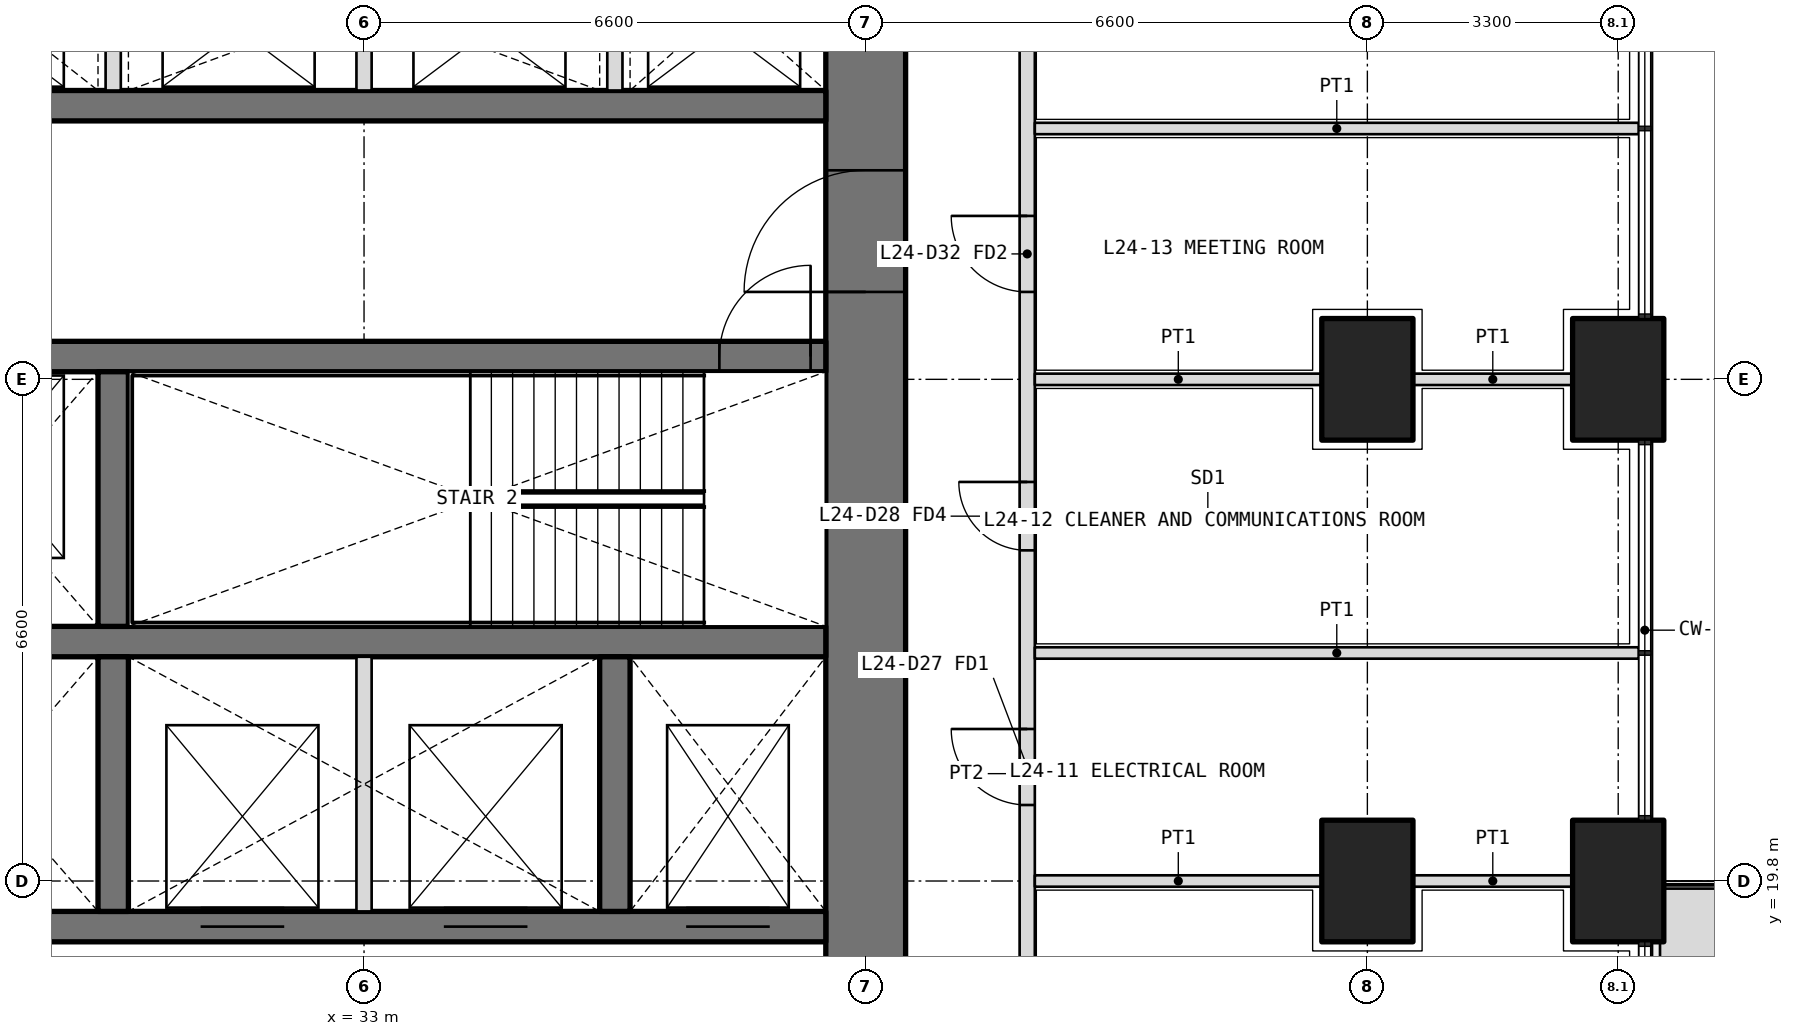
"""IFC4 building model, lengths in metres.
Left out: names, types, materials, properties, quantities, classifications, styles, units other than length and angle.
Written with IfcOpenShell. Run it as: python <this file> out.ifc"""

import sys

from ifc_helpers import new_model, si_unit, direction, frame, frame_2d, origin, origin_2d, place, context, subcontext, project, spatial, polyline, rectangle, outline, extrude, element, fill, save


model = new_model("IFC4")
c1 = context("Model", 3, precision=1e-05, world=origin(), true_north=direction((0.0, 1.0)))
c2 = subcontext(c1, "Body", "Model", "MODEL_VIEW")
j1 = project(units=[si_unit("LENGTHUNIT", "METRE"), si_unit("PLANEANGLEUNIT", "RADIAN")], contexts=[c1])
p1 = place(None, origin())
s1 = spatial("IfcSite", under=j1, at=p1, CompositionType="ELEMENT")
p2 = place(p1, origin())
s2 = spatial("IfcBuilding", under=s1, at=p2, CompositionType="ELEMENT")
p3 = place(p2, frame((0.0, 0.0, 107.4)))
s3 = spatial("IfcBuildingStorey", under=s2, at=p3, CompositionType="ELEMENT", Elevation=107.4)
for number, where, z_axis, x_axis in (
    (1, (49.5, 19.8, 0.0), (0.0, 0.0, 1.0), (0.0, 1.0, 0.0)),
    (2, (49.5, 26.4, 0.0), (0.0, 0.0, 1.0), (0.0, 1.0, 0.0)),
    (3, (46.2, 19.8, 0.0), (0.0, 0.0, 1.0), (0.0, 1.0, 0.0)),
    (4, (46.2, 26.4, 0.0), (0.0, 0.0, 1.0), (0.0, 1.0, 0.0)),
):
    element("IfcColumn", number, at=place(p3, frame(where, z_axis=z_axis, x_axis=x_axis)), inside=s3, PredefinedType="COLUMN", context=c2, shape_type="SweptSolid", body=[
        extrude(rectangle(XDim=1.6, YDim=1.2, at=origin_2d()), origin(), (0.0, 0.0, 1.0), 4.2),
    ])
p4 = place(p3, origin())
e5 = element("IfcWall", 5, at=p4, inside=s3, PredefinedType="USERDEFINED", context=c2, shape_type="SweptSolid", body=[
    extrude(outline(polyline([(50.05, 10.65), (51.05, 10.65), (51.05, 19.7), (50.05, 19.7), (50.05, 10.65)]), holes=[polyline([(50.2, 10.8), (50.9, 10.8), (50.9, 19.55), (50.2, 19.55), (50.2, 10.8)])]), origin(), (0.0, 0.0, 1.0), 1.05),
])
p5 = place(p3, frame((39.6, 13.725, 0.0), z_axis=(0.0, 0.0, 1.0), x_axis=(0.0, 1.0, 0.0)))
e6 = element("IfcWall", 6, at=p5, inside=s3, PredefinedType="SHEAR", context=c2, shape_type="SweptSolid", body=[
    extrude(rectangle(XDim=18.75, YDim=1.05, at=frame_2d((9.375, 0.0))), origin(), (0.0, 0.0, 1.0), 4.2),
])
p6 = place(p5, frame((3.025, 0.0, 0.0)))
e7 = element("IfcOpeningElement", 7, at=p6, cuts=e6, PredefinedType="OPENING", context=c2, shape_type="SweptSolid", body=[
    extrude(rectangle(XDim=1.6, YDim=2.1, at=frame_2d((0.8, 1.05))), frame((0.0, 0.535, 0.0), z_axis=(0.0, -1.0, 0.0), x_axis=(1.0, 0.0, 0.0)), (0.0, 0.0, 1.0), 1.07),
])
p7 = place(p5, frame((13.825, 0.0, 0.0)))
e8 = element("IfcOpeningElement", 8, at=p7, cuts=e6, PredefinedType="OPENING", context=c2, shape_type="SweptSolid", body=[
    extrude(rectangle(XDim=1.6, YDim=2.1, at=frame_2d((0.8, 1.05))), frame((0.0, 0.535, 0.0), z_axis=(0.0, -1.0, 0.0), x_axis=(1.0, 0.0, 0.0)), (0.0, 0.0, 1.0), 1.07),
])
p8 = place(p3, frame((13.725, 19.2, 0.0), z_axis=(0.0, 0.0, 1.0), x_axis=(1.0, 0.0, 0.0)))
e9 = element("IfcWall", 9, at=p8, inside=s3, PredefinedType="SHEAR", context=c2, shape_type="SweptSolid", body=[
    extrude(rectangle(XDim=25.35, YDim=0.4, at=frame_2d((12.675, 0.0))), origin(), (0.0, 0.0, 1.0), 4.2),
])
p9 = place(p8, frame((10.575, 0.0, 0.0)))
e10 = element("IfcOpeningElement", 10, at=p9, cuts=e9, PredefinedType="OPENING", context=c2, shape_type="SweptSolid", body=[
    extrude(rectangle(XDim=0.9, YDim=2.1, at=frame_2d((0.45, 1.05))), frame((0.0, 0.21, 0.0), z_axis=(0.0, -1.0, 0.0), x_axis=(1.0, 0.0, 0.0)), (0.0, 0.0, 1.0), 0.42),
])
p10 = place(p8, frame((13.875, 0.0, 0.0)))
e11 = element("IfcOpeningElement", 11, at=p10, cuts=e9, PredefinedType="OPENING", context=c2, shape_type="SweptSolid", body=[
    extrude(rectangle(XDim=0.9, YDim=2.1, at=frame_2d((0.45, 1.05))), frame((0.0, 0.21, 0.0), z_axis=(0.0, -1.0, 0.0), x_axis=(1.0, 0.0, 0.0)), (0.0, 0.0, 1.0), 0.42),
])
p11 = place(p8, frame((0.2, 0.0, 0.0)))
e12 = element("IfcOpeningElement", 12, at=p11, cuts=e9, PredefinedType="OPENING", context=c2, shape_type="SweptSolid", body=[
    extrude(rectangle(XDim=1.2, YDim=2.1, at=frame_2d((0.6, 1.05))), frame((0.0, 0.21, 0.0), z_axis=(0.0, -1.0, 0.0), x_axis=(1.0, 0.0, 0.0)), (0.0, 0.0, 1.0), 0.42),
])
p12 = place(p8, frame((23.512, 0.0, 0.0)))
e13 = element("IfcOpeningElement", 13, at=p12, cuts=e9, PredefinedType="OPENING", context=c2, shape_type="SweptSolid", body=[
    extrude(rectangle(XDim=1.1, YDim=2.1, at=frame_2d((0.55, 1.05))), frame((0.0, 0.21, 0.0), z_axis=(0.0, -1.0, 0.0), x_axis=(1.0, 0.0, 0.0)), (0.0, 0.0, 1.0), 0.42),
])
p13 = place(p8, frame((17.125, 0.0, 0.0)))
e14 = element("IfcOpeningElement", 14, at=p13, cuts=e9, PredefinedType="OPENING", context=c2, shape_type="SweptSolid", body=[
    extrude(rectangle(XDim=1.1, YDim=2.1, at=frame_2d((0.55, 1.05))), frame((0.0, 0.21, 0.0), z_axis=(0.0, -1.0, 0.0), x_axis=(1.0, 0.0, 0.0)), (0.0, 0.0, 1.0), 0.42),
])
p14 = place(p8, frame((20.325, 0.0, 0.0)))
e15 = element("IfcOpeningElement", 15, at=p14, cuts=e9, PredefinedType="OPENING", context=c2, shape_type="SweptSolid", body=[
    extrude(rectangle(XDim=1.1, YDim=2.1, at=frame_2d((0.55, 1.05))), frame((0.0, 0.21, 0.0), z_axis=(0.0, -1.0, 0.0), x_axis=(1.0, 0.0, 0.0)), (0.0, 0.0, 1.0), 0.42),
])
p15 = place(p3, frame((13.725, 22.95, 0.0), z_axis=(0.0, 0.0, 1.0), x_axis=(1.0, 0.0, 0.0)))
e16 = element("IfcWall", 16, at=p15, inside=s3, PredefinedType="SHEAR", context=c2, shape_type="SweptSolid", body=[
    extrude(rectangle(XDim=25.35, YDim=0.4, at=frame_2d((12.675, 0.0))), origin(), (0.0, 0.0, 1.0), 4.2),
])
p16 = place(p3, frame((13.725, 26.7, 0.0), z_axis=(0.0, 0.0, 1.0), x_axis=(1.0, 0.0, 0.0)))
e17 = element("IfcWall", 17, at=p16, inside=s3, PredefinedType="SHEAR", context=c2, shape_type="SweptSolid", body=[
    extrude(rectangle(XDim=25.35, YDim=0.4, at=frame_2d((12.675, 0.0))), origin(), (0.0, 0.0, 1.0), 4.2),
])
p17 = place(p16, frame((23.95, 0.0, 0.0)))
e18 = element("IfcOpeningElement", 18, at=p17, cuts=e17, PredefinedType="OPENING", context=c2, shape_type="SweptSolid", body=[
    extrude(rectangle(XDim=1.2, YDim=2.1, at=frame_2d((0.6, 1.05))), frame((0.0, 0.21, 0.0), z_axis=(0.0, -1.0, 0.0), x_axis=(1.0, 0.0, 0.0)), (0.0, 0.0, 1.0), 0.42),
])
p18 = place(p16, frame((0.738, 0.0, 0.0)))
e19 = element("IfcOpeningElement", 19, at=p18, cuts=e17, PredefinedType="OPENING", context=c2, shape_type="SweptSolid", body=[
    extrude(rectangle(XDim=1.1, YDim=2.1, at=frame_2d((0.55, 1.05))), frame((0.0, 0.21, 0.0), z_axis=(0.0, -1.0, 0.0), x_axis=(1.0, 0.0, 0.0)), (0.0, 0.0, 1.0), 0.42),
])
p19 = place(p16, frame((3.925, 0.0, 0.0)))
e20 = element("IfcOpeningElement", 20, at=p19, cuts=e17, PredefinedType="OPENING", context=c2, shape_type="SweptSolid", body=[
    extrude(rectangle(XDim=1.1, YDim=2.1, at=frame_2d((0.55, 1.05))), frame((0.0, 0.21, 0.0), z_axis=(0.0, -1.0, 0.0), x_axis=(1.0, 0.0, 0.0)), (0.0, 0.0, 1.0), 0.42),
])
p20 = place(p16, frame((7.175, 0.0, 0.0)))
e21 = element("IfcOpeningElement", 21, at=p20, cuts=e17, PredefinedType="OPENING", context=c2, shape_type="SweptSolid", body=[
    extrude(rectangle(XDim=1.1, YDim=2.1, at=frame_2d((0.55, 1.05))), frame((0.0, 0.21, 0.0), z_axis=(0.0, -1.0, 0.0), x_axis=(1.0, 0.0, 0.0)), (0.0, 0.0, 1.0), 0.42),
])
p21 = place(p16, frame((10.425, 0.0, 0.0)))
e22 = element("IfcOpeningElement", 22, at=p21, cuts=e17, PredefinedType="OPENING", context=c2, shape_type="SweptSolid", body=[
    extrude(rectangle(XDim=1.1, YDim=2.1, at=frame_2d((0.55, 1.05))), frame((0.0, 0.21, 0.0), z_axis=(0.0, -1.0, 0.0), x_axis=(1.0, 0.0, 0.0)), (0.0, 0.0, 1.0), 0.42),
])
p22 = place(p16, frame((13.775, 0.0, 0.0)))
e23 = element("IfcOpeningElement", 23, at=p22, cuts=e17, PredefinedType="OPENING", context=c2, shape_type="SweptSolid", body=[
    extrude(rectangle(XDim=1.1, YDim=2.1, at=frame_2d((0.55, 1.05))), frame((0.0, 0.21, 0.0), z_axis=(0.0, -1.0, 0.0), x_axis=(1.0, 0.0, 0.0)), (0.0, 0.0, 1.0), 0.42),
])
p23 = place(p3, frame((13.725, 30.0, 0.0), z_axis=(0.0, 0.0, 1.0), x_axis=(1.0, 0.0, 0.0)))
e24 = element("IfcWall", 24, at=p23, inside=s3, PredefinedType="SHEAR", context=c2, shape_type="SweptSolid", body=[
    extrude(rectangle(XDim=25.35, YDim=0.4, at=frame_2d((12.675, 0.0))), origin(), (0.0, 0.0, 1.0), 4.2),
])
for number, where, z_axis, x_axis in (
    (25, (29.7, 19.4, 0.0), (0.0, 0.0, 1.0), (0.0, 1.0, 0.0)),
    (26, (36.3, 19.4, 0.0), (0.0, 0.0, 1.0), (0.0, 1.0, 0.0)),
    (27, (29.7, 23.15, 0.0), (0.0, 0.0, 1.0), (0.0, 1.0, 0.0)),
):
    element("IfcWall", number, at=place(p3, frame(where, z_axis=z_axis, x_axis=x_axis)), inside=s3, PredefinedType="SHEAR", context=c2, shape_type="SweptSolid", body=[
        extrude(rectangle(XDim=3.35, YDim=0.4, at=frame_2d((1.675, 0.0))), origin(), (0.0, 0.0, 1.0), 4.2),
    ])
for number, where, z_axis, x_axis in (
    (28, (29.7, 30.2, 0.0), (0.0, 0.0, 1.0), (0.0, 1.0, 0.0)),
    (29, (33.0, 30.2, 0.0), (0.0, 0.0, 1.0), (0.0, 1.0, 0.0)),
    (30, (36.3, 30.2, 0.0), (0.0, 0.0, 1.0), (0.0, 1.0, 0.0)),
):
    element("IfcWall", number, at=place(p3, frame(where, z_axis=z_axis, x_axis=x_axis)), inside=s3, PredefinedType="PARTITIONING", context=c2, shape_type="SweptSolid", body=[
        extrude(rectangle(XDim=2.275, YDim=0.2, at=frame_2d((1.138, 0.0))), origin(), (0.0, 0.0, 1.0), 4.2),
    ])
p24 = place(p3, frame((33.0, 19.4, 0.0), z_axis=(0.0, 0.0, 1.0), x_axis=(0.0, 1.0, 0.0)))
e31 = element("IfcWall", 31, at=p24, inside=s3, PredefinedType="PARTITIONING", context=c2, shape_type="SweptSolid", body=[
    extrude(rectangle(XDim=3.35, YDim=0.2, at=frame_2d((1.675, 0.0))), origin(), (0.0, 0.0, 1.0), 4.2),
])
p25 = place(p3, frame((41.725, 7.4, 0.0), z_axis=(0.0, 0.0, 1.0), x_axis=(0.0, 1.0, 0.0)))
e32 = element("IfcWall", 32, at=p25, inside=s3, PredefinedType="PARTITIONING", context=c2, shape_type="SweptSolid", body=[
    extrude(rectangle(XDim=27.625, YDim=0.2, at=frame_2d((13.812, 0.0))), origin(), (0.0, 0.0, 1.0), 2.85),
])
p26 = place(p25, frame((5.65, 0.0, 0.0)))
e33 = element("IfcOpeningElement", 33, at=p26, cuts=e32, PredefinedType="OPENING", context=c2, shape_type="SweptSolid", body=[
    extrude(rectangle(XDim=1.0, YDim=2.1, at=frame_2d((0.5, 1.05))), frame((0.0, 0.11, 0.0), z_axis=(0.0, -1.0, 0.0), x_axis=(1.0, 0.0, 0.0)), (0.0, 0.0, 1.0), 0.22),
])
p27 = place(p25, frame((13.4, 0.0, 0.0)))
e34 = element("IfcOpeningElement", 34, at=p27, cuts=e32, PredefinedType="OPENING", context=c2, shape_type="SweptSolid", body=[
    extrude(rectangle(XDim=1.0, YDim=2.1, at=frame_2d((0.5, 1.05))), frame((0.0, 0.11, 0.0), z_axis=(0.0, -1.0, 0.0), x_axis=(1.0, 0.0, 0.0)), (0.0, 0.0, 1.0), 0.22),
])
p28 = place(p25, frame((16.75, 0.0, 0.0)))
e35 = element("IfcOpeningElement", 35, at=p28, cuts=e32, PredefinedType="OPENING", context=c2, shape_type="SweptSolid", body=[
    extrude(rectangle(XDim=0.9, YDim=2.1, at=frame_2d((0.45, 1.05))), frame((0.0, 0.11, 0.0), z_axis=(0.0, -1.0, 0.0), x_axis=(1.0, 0.0, 0.0)), (0.0, 0.0, 1.0), 0.22),
])
p29 = place(p25, frame((20.15, 0.0, 0.0)))
e36 = element("IfcOpeningElement", 36, at=p29, cuts=e32, PredefinedType="OPENING", context=c2, shape_type="SweptSolid", body=[
    extrude(rectangle(XDim=1.0, YDim=2.1, at=frame_2d((0.5, 1.05))), frame((0.0, 0.11, 0.0), z_axis=(0.0, -1.0, 0.0), x_axis=(1.0, 0.0, 0.0)), (0.0, 0.0, 1.0), 0.22),
])
p30 = place(p25, frame((24.512, 0.0, 0.0)))
e37 = element("IfcOpeningElement", 37, at=p30, cuts=e32, PredefinedType="OPENING", context=c2, shape_type="SweptSolid", body=[
    extrude(rectangle(XDim=1.0, YDim=2.1, at=frame_2d((0.5, 1.05))), frame((0.0, 0.11, 0.0), z_axis=(0.0, -1.0, 0.0), x_axis=(1.0, 0.0, 0.0)), (0.0, 0.0, 1.0), 0.22),
])
p31 = place(p3, frame((49.77, 22.8, 0.0), z_axis=(0.0, 0.0, 1.0), x_axis=(-1.0, 0.0, 0.0)))
e38 = element("IfcWall", 38, at=p31, inside=s3, PredefinedType="PARTITIONING", context=c2, shape_type="SweptSolid", body=[
    extrude(rectangle(XDim=7.945, YDim=0.15, at=frame_2d((3.973, 0.0))), origin(), (0.0, 0.0, 1.0), 2.7),
])
p32 = place(p3, frame((48.9, 26.4, 0.0), z_axis=(0.0, 0.0, 1.0), x_axis=(-1.0, 0.0, 0.0)))
e39 = element("IfcWall", 39, at=p32, inside=s3, PredefinedType="PARTITIONING", context=c2, shape_type="SweptSolid", body=[
    extrude(rectangle(XDim=2.1, YDim=0.15, at=frame_2d((1.05, 0.0))), origin(), (0.0, 0.0, 1.0), 2.85),
])
p33 = place(p3, frame((45.6, 26.4, 0.0), z_axis=(0.0, 0.0, 1.0), x_axis=(-1.0, 0.0, 0.0)))
e40 = element("IfcWall", 40, at=p33, inside=s3, PredefinedType="PARTITIONING", context=c2, shape_type="SweptSolid", body=[
    extrude(rectangle(XDim=3.775, YDim=0.15, at=frame_2d((1.888, 0.0))), origin(), (0.0, 0.0, 1.0), 2.85),
])
p34 = place(p3, frame((48.9, 19.8, 0.0), z_axis=(0.0, 0.0, 1.0), x_axis=(-1.0, 0.0, 0.0)))
e41 = element("IfcWall", 41, at=p34, inside=s3, PredefinedType="PARTITIONING", context=c2, shape_type="SweptSolid", body=[
    extrude(rectangle(XDim=2.1, YDim=0.15, at=frame_2d((1.05, 0.0))), origin(), (0.0, 0.0, 1.0), 2.85),
])
p35 = place(p3, frame((45.6, 19.8, 0.0), z_axis=(0.0, 0.0, 1.0), x_axis=(-1.0, 0.0, 0.0)))
e42 = element("IfcWall", 42, at=p35, inside=s3, PredefinedType="PARTITIONING", context=c2, shape_type="SweptSolid", body=[
    extrude(rectangle(XDim=3.775, YDim=0.15, at=frame_2d((1.888, 0.0))), origin(), (0.0, 0.0, 1.0), 2.85),
])
p36 = place(p3, frame((49.77, 29.7, 0.0), z_axis=(0.0, 0.0, 1.0), x_axis=(-1.0, 0.0, 0.0)))
e43 = element("IfcWall", 43, at=p36, inside=s3, PredefinedType="PARTITIONING", context=c2, shape_type="SweptSolid", body=[
    extrude(rectangle(XDim=7.945, YDim=0.15, at=frame_2d((3.973, 0.0))), origin(), (0.0, 0.0, 1.0), 2.7),
])
p37 = place(p27, origin())
e44 = element("IfcDoor", 44, at=p37, inside=s3, OperationType="SINGLE_SWING_RIGHT", PredefinedType="DOOR", context=c2, shape_type="SweptSolid", body=[
    extrude(rectangle(XDim=1.0, YDim=2.1, at=frame_2d((0.5, 1.05))), frame((0.0, 0.025, 0.0), z_axis=(0.0, -1.0, 0.0), x_axis=(1.0, 0.0, 0.0)), (0.0, 0.0, 1.0), 0.05),
])
fill(e34, e44)
p38 = place(p28, origin())
e45 = element("IfcDoor", 45, at=p38, inside=s3, OperationType="SINGLE_SWING_RIGHT", PredefinedType="DOOR", context=c2, shape_type="SweptSolid", body=[
    extrude(rectangle(XDim=0.9, YDim=2.1, at=frame_2d((0.45, 1.05))), frame((0.0, 0.025, 0.0), z_axis=(0.0, -1.0, 0.0), x_axis=(1.0, 0.0, 0.0)), (0.0, 0.0, 1.0), 0.05),
])
fill(e35, e45)
p39 = place(p29, origin())
e46 = element("IfcDoor", 46, at=p39, inside=s3, OperationType="SINGLE_SWING_RIGHT", PredefinedType="DOOR", context=c2, shape_type="SweptSolid", body=[
    extrude(rectangle(XDim=1.0, YDim=2.1, at=frame_2d((0.5, 1.05))), frame((0.0, 0.025, 0.0), z_axis=(0.0, -1.0, 0.0), x_axis=(1.0, 0.0, 0.0)), (0.0, 0.0, 1.0), 0.05),
])
fill(e36, e46)
p40 = place(p17, origin())
e47 = element("IfcDoor", 47, at=p40, inside=s3, OperationType="SINGLE_SWING_RIGHT", PredefinedType="DOOR", context=c2, shape_type="SweptSolid", body=[
    extrude(rectangle(XDim=1.2, YDim=2.1, at=frame_2d((0.6, 1.05))), frame((0.0, 0.025, 0.0), z_axis=(0.0, -1.0, 0.0), x_axis=(1.0, 0.0, 0.0)), (0.0, 0.0, 1.0), 0.05),
])
fill(e18, e47)
p41 = place(p7, origin())
e48 = element("IfcDoor", 48, at=p41, inside=s3, OperationType="DOUBLE_DOOR_DOUBLE_SWING", PredefinedType="DOOR", context=c2, shape_type="SweptSolid", body=[
    extrude(rectangle(XDim=1.6, YDim=2.1, at=frame_2d((0.8, 1.05))), frame((0.0, 0.025, 0.0), z_axis=(0.0, -1.0, 0.0), x_axis=(1.0, 0.0, 0.0)), (0.0, 0.0, 1.0), 0.05),
])
fill(e8, e48)
p42 = place(p12, origin())
e49 = element("IfcDoor", 49, at=p42, inside=s3, OperationType="DOUBLE_DOOR_SLIDING", PredefinedType="DOOR", context=c2, shape_type="SweptSolid", body=[
    extrude(rectangle(XDim=1.1, YDim=2.1, at=frame_2d((0.55, 1.05))), frame((0.0, 0.025, 0.0), z_axis=(0.0, -1.0, 0.0), x_axis=(1.0, 0.0, 0.0)), (0.0, 0.0, 1.0), 0.05),
])
fill(e13, e49)
p43 = place(p13, origin())
e50 = element("IfcDoor", 50, at=p43, inside=s3, OperationType="DOUBLE_DOOR_SLIDING", PredefinedType="DOOR", context=c2, shape_type="SweptSolid", body=[
    extrude(rectangle(XDim=1.1, YDim=2.1, at=frame_2d((0.55, 1.05))), frame((0.0, 0.025, 0.0), z_axis=(0.0, -1.0, 0.0), x_axis=(1.0, 0.0, 0.0)), (0.0, 0.0, 1.0), 0.05),
])
fill(e14, e50)
p44 = place(p14, origin())
e51 = element("IfcDoor", 51, at=p44, inside=s3, OperationType="DOUBLE_DOOR_SLIDING", PredefinedType="DOOR", context=c2, shape_type="SweptSolid", body=[
    extrude(rectangle(XDim=1.1, YDim=2.1, at=frame_2d((0.55, 1.05))), frame((0.0, 0.025, 0.0), z_axis=(0.0, -1.0, 0.0), x_axis=(1.0, 0.0, 0.0)), (0.0, 0.0, 1.0), 0.05),
])
fill(e15, e51)
save(model, sys.argv[1])
